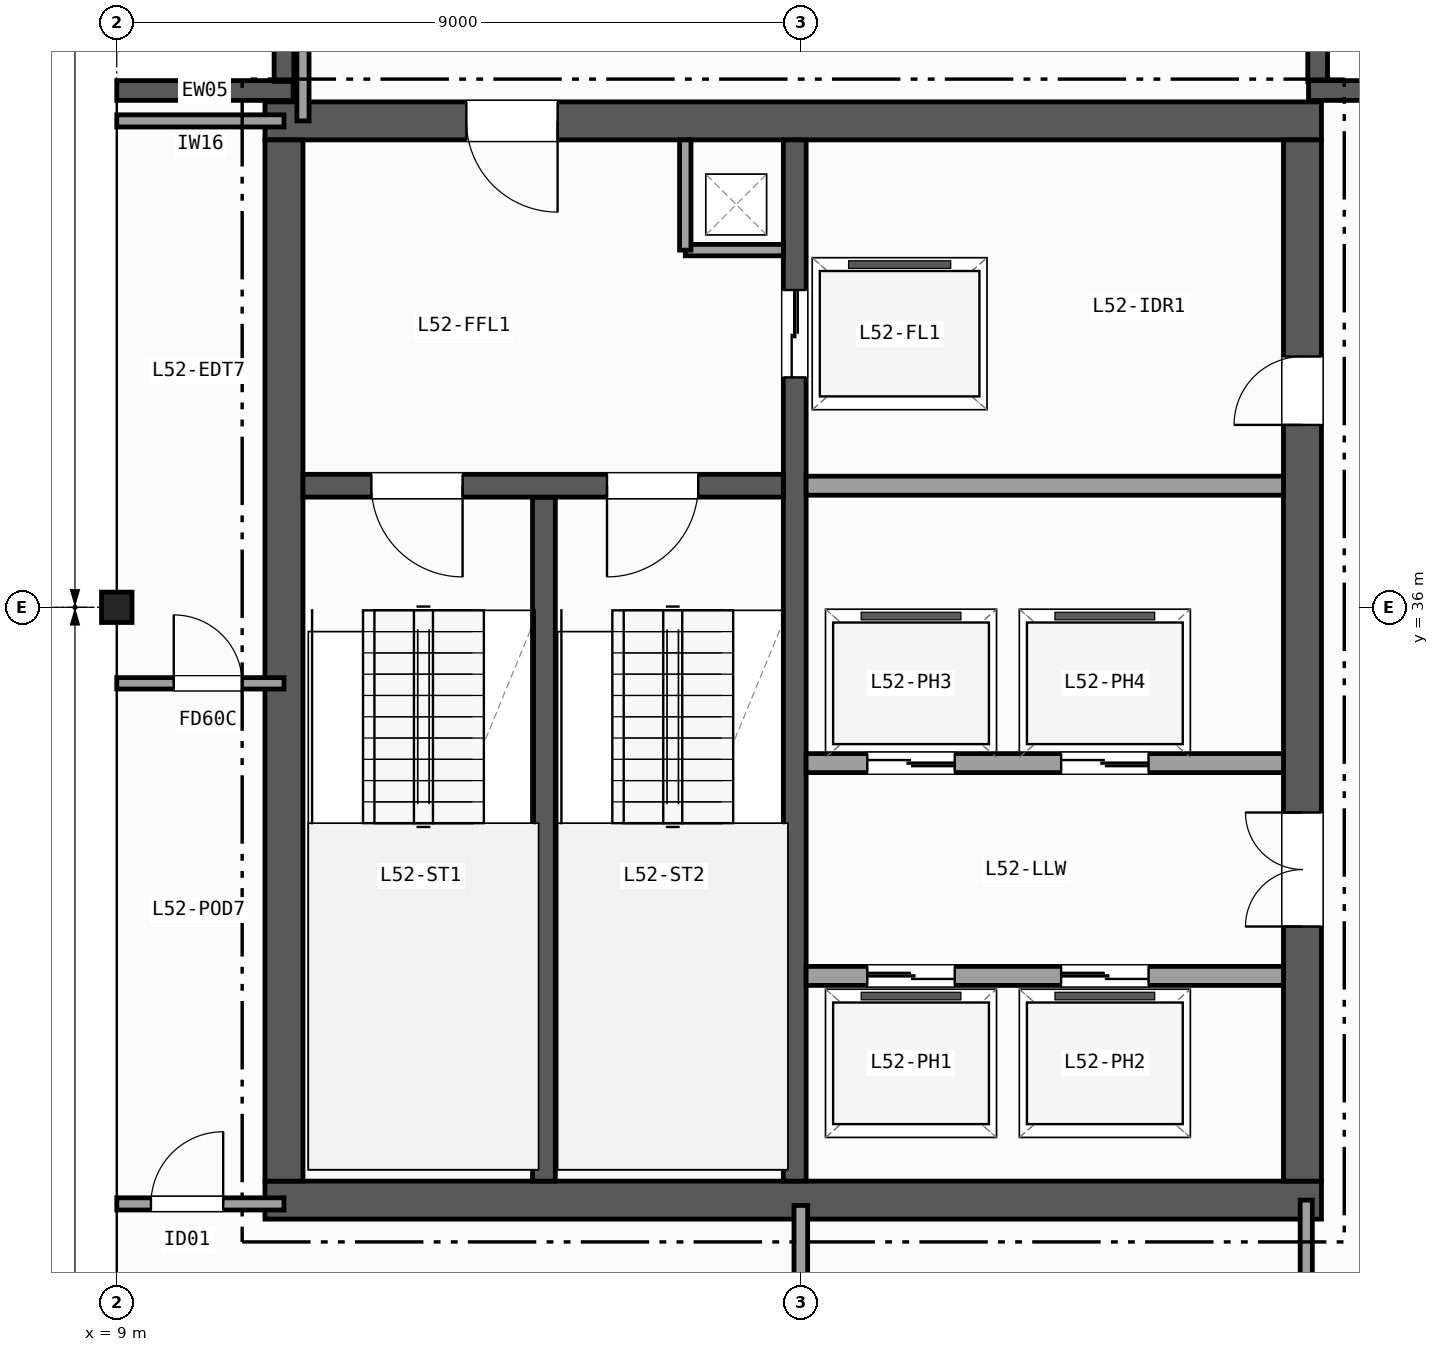
"""IFC4 building model, lengths in metres.
Left out: names, types, materials, properties, quantities, classifications, styles, units other than length and angle.
Written with IfcOpenShell. Run it as: python <this file> out.ifc"""

import sys

from ifc_helpers import new_model, si_unit, direction, frame, frame_2d, origin, origin_2d, place, context, subcontext, project, spatial, rectangle, i_section, extrude, element, fill, save


model = new_model("IFC4")
c1 = context("Model", 3, precision=1e-05, world=origin(), true_north=direction((0.0, 1.0)))
c2 = subcontext(c1, "Body", "Model", "MODEL_VIEW")
j1 = project(units=[si_unit("LENGTHUNIT", "METRE"), si_unit("PLANEANGLEUNIT", "RADIAN")], contexts=[c1])
p1 = place(None, origin())
s1 = spatial("IfcSite", under=j1, at=p1, CompositionType="ELEMENT")
p2 = place(p1, origin())
s2 = spatial("IfcBuilding", under=s1, at=p2, CompositionType="ELEMENT")
p3 = place(p2, frame((0.0, 0.0, 209.9)))
s3 = spatial("IfcBuildingStorey", under=s2, at=p3, CompositionType="ELEMENT", Elevation=209.9)
p4 = place(p3, frame((9.0, 36.0, 0.0), z_axis=(0.0, 0.0, 1.0), x_axis=(1.0, 0.0, 0.0)))
e1 = element("IfcColumn", 1, at=p4, inside=s3, PredefinedType="COLUMN", context=c2, shape_type="SweptSolid", body=[
    extrude(i_section(OverallWidth=0.401, OverallDepth=0.399, WebThickness=0.025, FlangeThickness=0.04, FilletRadius=0.015, at=origin_2d()), origin(), (0.0, 0.0, 1.0), 3.7),
])
p5 = place(p3, frame((9.0, 42.8, 0.0), z_axis=(0.0, 0.0, 1.0), x_axis=(1.0, 0.0, 0.0)))
e2 = element("IfcWall", 2, at=p5, inside=s3, PredefinedType="SOLIDWALL", context=c2, shape_type="SweptSolid", body=[
    extrude(rectangle(XDim=2.32, YDim=0.26, at=frame_2d((1.16, 0.0))), origin(), (0.0, 0.0, 1.0), 3.42),
])
for number, where, z_axis, x_axis in (
    (3, (11.2, 42.92, 0.0), (0.0, 0.0, 1.0), (0.0, 1.0, 0.0)),
    (4, (24.8, 45.0, 0.0), (0.0, 0.0, 1.0), (0.0, -1.0, 0.0)),
):
    element("IfcWall", number, at=place(p3, frame(where, z_axis=z_axis, x_axis=x_axis)), inside=s3, PredefinedType="SOLIDWALL", context=c2, shape_type="SweptSolid", body=[
        extrude(rectangle(XDim=2.08, YDim=0.26, at=frame_2d((1.04, 0.0))), origin(), (0.0, 0.0, 1.0), 3.42),
    ])
p6 = place(p3, frame((24.68, 42.8, 0.0), z_axis=(0.0, 0.0, 1.0), x_axis=(1.0, 0.0, 0.0)))
e5 = element("IfcWall", 5, at=p6, inside=s3, PredefinedType="SOLIDWALL", context=c2, shape_type="SweptSolid", body=[
    extrude(rectangle(XDim=2.32, YDim=0.26, at=frame_2d((1.16, 0.0))), origin(), (0.0, 0.0, 1.0), 3.42),
])
p7 = place(p3, frame((10.95, 28.2, 0.0), z_axis=(0.0, 0.0, 1.0), x_axis=(1.0, 0.0, 0.0)))
e6 = element("IfcWall", 6, at=p7, inside=s3, PredefinedType="SHEAR", context=c2, shape_type="SweptSolid", body=[
    extrude(rectangle(XDim=13.9, YDim=0.5, at=frame_2d((6.95, 0.0))), origin(), (0.0, 0.0, 1.0), 3.42),
])
p8 = place(p3, frame((24.85, 42.4, 0.0), z_axis=(0.0, 0.0, 1.0), x_axis=(-1.0, 0.0, 0.0)))
e7 = element("IfcWall", 7, at=p8, inside=s3, PredefinedType="SHEAR", context=c2, shape_type="SweptSolid", body=[
    extrude(rectangle(XDim=13.9, YDim=0.5, at=frame_2d((6.95, 0.0))), origin(), (0.0, 0.0, 1.0), 3.42),
])
p9 = place(p8, frame((10.05, 0.0, 0.0)))
e8 = element("IfcOpeningElement", 8, at=p9, cuts=e7, PredefinedType="OPENING", context=c2, shape_type="SweptSolid", body=[
    extrude(rectangle(XDim=1.2, YDim=2.15, at=frame_2d((0.6, 1.075))), frame((0.0, 0.26, 0.0), z_axis=(0.0, -1.0, 0.0), x_axis=(1.0, 0.0, 0.0)), (0.0, 0.0, 1.0), 0.52),
])
p10 = place(p3, frame((11.2, 42.15, 0.0), z_axis=(0.0, 0.0, 1.0), x_axis=(0.0, -1.0, 0.0)))
e9 = element("IfcWall", 9, at=p10, inside=s3, PredefinedType="SHEAR", context=c2, shape_type="SweptSolid", body=[
    extrude(rectangle(XDim=13.7, YDim=0.5, at=frame_2d((6.85, 0.0))), origin(), (0.0, 0.0, 1.0), 3.42),
])
p11 = place(p3, frame((24.6, 28.45, 0.0), z_axis=(0.0, 0.0, 1.0), x_axis=(0.0, 1.0, 0.0)))
e10 = element("IfcWall", 10, at=p11, inside=s3, PredefinedType="SHEAR", context=c2, shape_type="SweptSolid", body=[
    extrude(rectangle(XDim=13.7, YDim=0.5, at=frame_2d((6.85, 0.0))), origin(), (0.0, 0.0, 1.0), 3.42),
])
p12 = place(p11, frame((3.35, 0.0, 0.0)))
e11 = element("IfcOpeningElement", 11, at=p12, cuts=e10, PredefinedType="OPENING", context=c2, shape_type="SweptSolid", body=[
    extrude(rectangle(XDim=1.5, YDim=2.2, at=frame_2d((0.75, 1.1))), frame((0.0, 0.26, 0.0), z_axis=(0.0, -1.0, 0.0), x_axis=(1.0, 0.0, 0.0)), (0.0, 0.0, 1.0), 0.52),
])
p13 = place(p11, frame((9.95, 0.0, 0.0)))
e12 = element("IfcOpeningElement", 12, at=p13, cuts=e10, PredefinedType="OPENING", context=c2, shape_type="SweptSolid", body=[
    extrude(rectangle(XDim=0.9, YDim=2.1, at=frame_2d((0.45, 1.05))), frame((0.0, 0.26, 0.0), z_axis=(0.0, -1.0, 0.0), x_axis=(1.0, 0.0, 0.0)), (0.0, 0.0, 1.0), 0.52),
])
p14 = place(p3, frame((14.62, 28.45, 0.0), z_axis=(0.0, 0.0, 1.0), x_axis=(0.0, 1.0, 0.0)))
e13 = element("IfcWall", 13, at=p14, inside=s3, PredefinedType="SHEAR", context=c2, shape_type="SweptSolid", body=[
    extrude(rectangle(XDim=9.0, YDim=0.3, at=frame_2d((4.5, 0.0))), origin(), (0.0, 0.0, 1.0), 3.42),
])
p15 = place(p3, frame((17.92, 42.15, 0.0), z_axis=(0.0, 0.0, 1.0), x_axis=(0.0, -1.0, 0.0)))
e14 = element("IfcWall", 14, at=p15, inside=s3, PredefinedType="SHEAR", context=c2, shape_type="SweptSolid", body=[
    extrude(rectangle(XDim=13.7, YDim=0.3, at=frame_2d((6.85, 0.0))), origin(), (0.0, 0.0, 1.0), 3.42),
])
p16 = place(p15, frame((1.975, 0.0, 0.0)))
e15 = element("IfcOpeningElement", 15, at=p16, cuts=e14, PredefinedType="OPENING", context=c2, shape_type="SweptSolid", body=[
    extrude(rectangle(XDim=1.15, YDim=2.15, at=frame_2d((0.575, 1.075))), frame((0.0, 0.16, 0.0), z_axis=(0.0, -1.0, 0.0), x_axis=(1.0, 0.0, 0.0)), (0.0, 0.0, 1.0), 0.32),
])
p17 = place(p3, frame((17.77, 37.6, 0.0), z_axis=(0.0, 0.0, 1.0), x_axis=(-1.0, 0.0, 0.0)))
e16 = element("IfcWall", 16, at=p17, inside=s3, PredefinedType="SHEAR", context=c2, shape_type="SweptSolid", body=[
    extrude(rectangle(XDim=6.32, YDim=0.3, at=frame_2d((3.16, 0.0))), origin(), (0.0, 0.0, 1.0), 3.42),
])
p18 = place(p17, frame((4.22, 0.0, 0.0)))
e17 = element("IfcOpeningElement", 17, at=p18, cuts=e16, PredefinedType="OPENING", context=c2, shape_type="SweptSolid", body=[
    extrude(rectangle(XDim=1.2, YDim=2.15, at=frame_2d((0.6, 1.075))), frame((0.0, 0.16, 0.0), z_axis=(0.0, -1.0, 0.0), x_axis=(1.0, 0.0, 0.0)), (0.0, 0.0, 1.0), 0.32),
])
p19 = place(p17, frame((1.12, 0.0, 0.0)))
e18 = element("IfcOpeningElement", 18, at=p19, cuts=e16, PredefinedType="OPENING", context=c2, shape_type="SweptSolid", body=[
    extrude(rectangle(XDim=1.2, YDim=2.15, at=frame_2d((0.6, 1.075))), frame((0.0, 0.16, 0.0), z_axis=(0.0, -1.0, 0.0), x_axis=(1.0, 0.0, 0.0)), (0.0, 0.0, 1.0), 0.32),
])
p20 = place(p3, frame((16.48, 40.7, 0.0), z_axis=(0.0, 0.0, 1.0), x_axis=(1.0, 0.0, 0.0)))
e19 = element("IfcWall", 19, at=p20, inside=s3, PredefinedType="PARTITIONING", context=c2, shape_type="SweptSolid", body=[
    extrude(rectangle(XDim=1.29, YDim=0.15, at=frame_2d((0.645, 0.0))), origin(), (0.0, 0.0, 1.0), 3.42),
])
p21 = place(p3, frame((16.48, 40.7, 0.0), z_axis=(0.0, 0.0, 1.0), x_axis=(0.0, 1.0, 0.0)))
e20 = element("IfcWall", 20, at=p21, inside=s3, PredefinedType="PARTITIONING", context=c2, shape_type="SweptSolid", body=[
    extrude(rectangle(XDim=1.45, YDim=0.15, at=frame_2d((0.725, 0.0))), origin(), (0.0, 0.0, 1.0), 3.42),
])
p22 = place(p3, frame((18.07, 37.6, 0.0), z_axis=(0.0, 0.0, 1.0), x_axis=(1.0, 0.0, 0.0)))
e21 = element("IfcWall", 21, at=p22, inside=s3, PredefinedType="PARTITIONING", context=c2, shape_type="SweptSolid", body=[
    extrude(rectangle(XDim=6.28, YDim=0.25, at=frame_2d((3.14, 0.0))), origin(), (0.0, 0.0, 1.0), 3.42),
])
p23 = place(p3, frame((18.07, 31.15, 0.0), z_axis=(0.0, 0.0, 1.0), x_axis=(1.0, 0.0, 0.0)))
e22 = element("IfcWall", 22, at=p23, inside=s3, PredefinedType="PARTITIONING", context=c2, shape_type="SweptSolid", body=[
    extrude(rectangle(XDim=6.28, YDim=0.25, at=frame_2d((3.14, 0.0))), origin(), (0.0, 0.0, 1.0), 3.42),
])
p24 = place(p23, frame((0.805, 0.0, 0.0)))
e23 = element("IfcOpeningElement", 23, at=p24, cuts=e22, PredefinedType="OPENING", context=c2, shape_type="SweptSolid", body=[
    extrude(rectangle(XDim=1.15, YDim=2.15, at=frame_2d((0.575, 1.075))), frame((0.0, 0.135, 0.0), z_axis=(0.0, -1.0, 0.0), x_axis=(1.0, 0.0, 0.0)), (0.0, 0.0, 1.0), 0.27),
])
p25 = place(p23, frame((3.355, 0.0, 0.0)))
e24 = element("IfcOpeningElement", 24, at=p25, cuts=e22, PredefinedType="OPENING", context=c2, shape_type="SweptSolid", body=[
    extrude(rectangle(XDim=1.15, YDim=2.15, at=frame_2d((0.575, 1.075))), frame((0.0, 0.135, 0.0), z_axis=(0.0, -1.0, 0.0), x_axis=(1.0, 0.0, 0.0)), (0.0, 0.0, 1.0), 0.27),
])
p26 = place(p3, frame((24.35, 33.95, 0.0), z_axis=(0.0, 0.0, 1.0), x_axis=(-1.0, 0.0, 0.0)))
e25 = element("IfcWall", 25, at=p26, inside=s3, PredefinedType="PARTITIONING", context=c2, shape_type="SweptSolid", body=[
    extrude(rectangle(XDim=6.28, YDim=0.25, at=frame_2d((3.14, 0.0))), origin(), (0.0, 0.0, 1.0), 3.42),
])
p27 = place(p26, frame((4.325, 0.0, 0.0)))
e26 = element("IfcOpeningElement", 26, at=p27, cuts=e25, PredefinedType="OPENING", context=c2, shape_type="SweptSolid", body=[
    extrude(rectangle(XDim=1.15, YDim=2.15, at=frame_2d((0.575, 1.075))), frame((0.0, 0.135, 0.0), z_axis=(0.0, -1.0, 0.0), x_axis=(1.0, 0.0, 0.0)), (0.0, 0.0, 1.0), 0.27),
])
p28 = place(p26, frame((1.775, 0.0, 0.0)))
e27 = element("IfcOpeningElement", 27, at=p28, cuts=e25, PredefinedType="OPENING", context=c2, shape_type="SweptSolid", body=[
    extrude(rectangle(XDim=1.15, YDim=2.15, at=frame_2d((0.575, 1.075))), frame((0.0, 0.135, 0.0), z_axis=(0.0, -1.0, 0.0), x_axis=(1.0, 0.0, 0.0)), (0.0, 0.0, 1.0), 0.27),
])
p29 = place(p3, frame((9.0, 28.15, 0.0), z_axis=(0.0, 0.0, 1.0), x_axis=(1.0, 0.0, 0.0)))
e28 = element("IfcWall", 28, at=p29, inside=s3, PredefinedType="PARTITIONING", context=c2, shape_type="SweptSolid", body=[
    extrude(rectangle(XDim=2.2, YDim=0.16, at=frame_2d((1.1, 0.0))), origin(), (0.0, 0.0, 1.0), 2.707),
])
p30 = place(p29, frame((0.45, 0.0, 0.0)))
e29 = element("IfcOpeningElement", 29, at=p30, cuts=e28, PredefinedType="OPENING", context=c2, shape_type="SweptSolid", body=[
    extrude(rectangle(XDim=0.95, YDim=2.1, at=frame_2d((0.475, 1.05))), frame((0.0, 0.09, 0.0), z_axis=(0.0, -1.0, 0.0), x_axis=(1.0, 0.0, 0.0)), (0.0, 0.0, 1.0), 0.18),
])
p31 = place(p3, frame((9.0, 42.4, 0.0), z_axis=(0.0, 0.0, 1.0), x_axis=(1.0, 0.0, 0.0)))
e30 = element("IfcWall", 30, at=p31, inside=s3, PredefinedType="PARTITIONING", context=c2, shape_type="SweptSolid", body=[
    extrude(rectangle(XDim=2.2, YDim=0.16, at=frame_2d((1.1, 0.0))), origin(), (0.0, 0.0, 1.0), 3.42),
])
p32 = place(p3, frame((11.45, 42.4, 0.0), z_axis=(0.0, 0.0, 1.0), x_axis=(0.0, 1.0, 0.0)))
e31 = element("IfcWall", 31, at=p32, inside=s3, PredefinedType="PARTITIONING", context=c2, shape_type="SweptSolid", body=[
    extrude(rectangle(XDim=2.666, YDim=0.16, at=frame_2d((1.333, 0.0))), origin(), (0.0, 0.0, 1.0), 3.42),
])
p33 = place(p3, frame((9.0, 35.0, 0.0), z_axis=(0.0, 0.0, 1.0), x_axis=(1.0, 0.0, 0.0)))
e32 = element("IfcWall", 32, at=p33, inside=s3, PredefinedType="PARTITIONING", context=c2, shape_type="SweptSolid", body=[
    extrude(rectangle(XDim=2.2, YDim=0.15, at=frame_2d((1.1, 0.0))), origin(), (0.0, 0.0, 1.0), 2.707),
])
p34 = place(p33, frame((0.75, 0.0, 0.0)))
e33 = element("IfcOpeningElement", 33, at=p34, cuts=e32, PredefinedType="OPENING", context=c2, shape_type="SweptSolid", body=[
    extrude(rectangle(XDim=0.9, YDim=2.1, at=frame_2d((0.45, 1.05))), frame((0.0, 0.085, 0.0), z_axis=(0.0, -1.0, 0.0), x_axis=(1.0, 0.0, 0.0)), (0.0, 0.0, 1.0), 0.17),
])
p35 = place(p3, frame((24.65, 9.0, 0.0), z_axis=(0.0, 0.0, 1.0), x_axis=(0.0, 1.0, 0.0)))
e34 = element("IfcWall", 34, at=p35, inside=s3, PredefinedType="PARTITIONING", context=c2, shape_type="SweptSolid", body=[
    extrude(rectangle(XDim=19.2, YDim=0.16, at=frame_2d((9.6, 0.0))), origin(), (0.0, 0.0, 1.0), 2.707),
])
p36 = place(p35, frame((2.8, 0.0, 0.0)))
e35 = element("IfcOpeningElement", 35, at=p36, cuts=e34, PredefinedType="OPENING", context=c2, shape_type="SweptSolid", body=[
    extrude(rectangle(XDim=1.05, YDim=2.15, at=frame_2d((0.525, 1.075))), frame((0.0, 0.09, 0.0), z_axis=(0.0, -1.0, 0.0), x_axis=(1.0, 0.0, 0.0)), (0.0, 0.0, 1.0), 0.18),
])
p37 = place(p35, frame((8.95, 0.0, 0.0)))
e36 = element("IfcOpeningElement", 36, at=p37, cuts=e34, PredefinedType="OPENING", context=c2, shape_type="SweptSolid", body=[
    extrude(rectangle(XDim=1.2, YDim=2.15, at=frame_2d((0.6, 1.075))), frame((0.0, 0.09, 0.0), z_axis=(0.0, -1.0, 0.0), x_axis=(1.0, 0.0, 0.0)), (0.0, 0.0, 1.0), 0.18),
])
p38 = place(p35, frame((15.215, 0.0, 0.0)))
e37 = element("IfcOpeningElement", 37, at=p38, cuts=e34, PredefinedType="OPENING", context=c2, shape_type="SweptSolid", body=[
    extrude(rectangle(XDim=0.86, YDim=2.05, at=frame_2d((0.43, 1.025))), frame((0.0, 0.09, 0.0), z_axis=(0.0, -1.0, 0.0), x_axis=(1.0, 0.0, 0.0)), (0.0, 0.0, 1.0), 0.18),
])
p39 = place(p3, frame((18.0, 9.0, 0.0), z_axis=(0.0, 0.0, 1.0), x_axis=(0.0, 1.0, 0.0)))
e38 = element("IfcWall", 38, at=p39, inside=s3, PredefinedType="PARTITIONING", context=c2, shape_type="SweptSolid", body=[
    extrude(rectangle(XDim=19.13, YDim=0.18, at=frame_2d((9.565, 0.0))), origin(), (0.0, 0.0, 1.0), 2.707),
])
p40 = place(p39, frame((2.2, 0.0, 0.0)))
e39 = element("IfcOpeningElement", 39, at=p40, cuts=e38, PredefinedType="OPENING", context=c2, shape_type="SweptSolid", body=[
    extrude(rectangle(XDim=0.95, YDim=2.1, at=frame_2d((0.475, 1.05))), frame((0.0, 0.1, 0.0), z_axis=(0.0, -1.0, 0.0), x_axis=(1.0, 0.0, 0.0)), (0.0, 0.0, 1.0), 0.2),
])
p41 = place(p39, frame((13.5, 0.0, 0.0)))
e40 = element("IfcOpeningElement", 40, at=p41, cuts=e38, PredefinedType="OPENING", context=c2, shape_type="SweptSolid", body=[
    extrude(rectangle(XDim=1.0, YDim=2.1, at=frame_2d((0.5, 1.05))), frame((0.0, 0.1, 0.0), z_axis=(0.0, -1.0, 0.0), x_axis=(1.0, 0.0, 0.0)), (0.0, 0.0, 1.0), 0.2),
])
p42 = place(p18, origin())
e41 = element("IfcDoor", 41, at=p42, inside=s3, OperationType="SINGLE_SWING_LEFT", PredefinedType="DOOR", context=c2, shape_type="SweptSolid", body=[
    extrude(rectangle(XDim=1.2, YDim=2.15, at=frame_2d((0.6, 1.075))), frame((0.0, 0.025, 0.0), z_axis=(0.0, -1.0, 0.0), x_axis=(1.0, 0.0, 0.0)), (0.0, 0.0, 1.0), 0.05),
])
fill(e17, e41)
p43 = place(p19, origin())
e42 = element("IfcDoor", 42, at=p43, inside=s3, OperationType="SINGLE_SWING_RIGHT", PredefinedType="DOOR", context=c2, shape_type="SweptSolid", body=[
    extrude(rectangle(XDim=1.2, YDim=2.15, at=frame_2d((0.6, 1.075))), frame((0.0, 0.025, 0.0), z_axis=(0.0, -1.0, 0.0), x_axis=(1.0, 0.0, 0.0)), (0.0, 0.0, 1.0), 0.05),
])
fill(e18, e42)
p44 = place(p12, origin())
e43 = element("IfcDoor", 43, at=p44, inside=s3, OperationType="DOUBLE_DOOR_SINGLE_SWING", PredefinedType="DOOR", context=c2, shape_type="SweptSolid", body=[
    extrude(rectangle(XDim=1.5, YDim=2.2, at=frame_2d((0.75, 1.1))), frame((0.0, 0.025, 0.0), z_axis=(0.0, -1.0, 0.0), x_axis=(1.0, 0.0, 0.0)), (0.0, 0.0, 1.0), 0.05),
])
fill(e11, e43)
p45 = place(p9, origin())
e44 = element("IfcDoor", 44, at=p45, inside=s3, OperationType="SINGLE_SWING_LEFT", PredefinedType="DOOR", context=c2, shape_type="SweptSolid", body=[
    extrude(rectangle(XDim=1.2, YDim=2.15, at=frame_2d((0.6, 1.075))), frame((0.0, 0.025, 0.0), z_axis=(0.0, -1.0, 0.0), x_axis=(1.0, 0.0, 0.0)), (0.0, 0.0, 1.0), 0.05),
])
fill(e8, e44)
p46 = place(p13, origin())
e45 = element("IfcDoor", 45, at=p46, inside=s3, OperationType="SINGLE_SWING_LEFT", PredefinedType="DOOR", context=c2, shape_type="SweptSolid", body=[
    extrude(rectangle(XDim=0.9, YDim=2.1, at=frame_2d((0.45, 1.05))), frame((0.0, 0.025, 0.0), z_axis=(0.0, -1.0, 0.0), x_axis=(1.0, 0.0, 0.0)), (0.0, 0.0, 1.0), 0.05),
])
fill(e12, e45)
p47 = place(p16, origin())
e46 = element("IfcDoor", 46, at=p47, inside=s3, OperationType="DOUBLE_DOOR_SLIDING", PredefinedType="DOOR", context=c2, shape_type="SweptSolid", body=[
    extrude(rectangle(XDim=1.15, YDim=2.15, at=frame_2d((0.575, 1.075))), frame((0.0, 0.025, 0.0), z_axis=(0.0, -1.0, 0.0), x_axis=(1.0, 0.0, 0.0)), (0.0, 0.0, 1.0), 0.05),
])
fill(e15, e46)
p48 = place(p24, origin())
e47 = element("IfcDoor", 47, at=p48, inside=s3, OperationType="DOUBLE_DOOR_SLIDING", PredefinedType="DOOR", context=c2, shape_type="SweptSolid", body=[
    extrude(rectangle(XDim=1.15, YDim=2.15, at=frame_2d((0.575, 1.075))), frame((0.0, 0.025, 0.0), z_axis=(0.0, -1.0, 0.0), x_axis=(1.0, 0.0, 0.0)), (0.0, 0.0, 1.0), 0.05),
])
fill(e23, e47)
p49 = place(p25, origin())
e48 = element("IfcDoor", 48, at=p49, inside=s3, OperationType="DOUBLE_DOOR_SLIDING", PredefinedType="DOOR", context=c2, shape_type="SweptSolid", body=[
    extrude(rectangle(XDim=1.15, YDim=2.15, at=frame_2d((0.575, 1.075))), frame((0.0, 0.025, 0.0), z_axis=(0.0, -1.0, 0.0), x_axis=(1.0, 0.0, 0.0)), (0.0, 0.0, 1.0), 0.05),
])
fill(e24, e48)
p50 = place(p27, origin())
e49 = element("IfcDoor", 49, at=p50, inside=s3, OperationType="DOUBLE_DOOR_SLIDING", PredefinedType="DOOR", context=c2, shape_type="SweptSolid", body=[
    extrude(rectangle(XDim=1.15, YDim=2.15, at=frame_2d((0.575, 1.075))), frame((0.0, 0.025, 0.0), z_axis=(0.0, -1.0, 0.0), x_axis=(1.0, 0.0, 0.0)), (0.0, 0.0, 1.0), 0.05),
])
fill(e26, e49)
p51 = place(p28, origin())
e50 = element("IfcDoor", 50, at=p51, inside=s3, OperationType="DOUBLE_DOOR_SLIDING", PredefinedType="DOOR", context=c2, shape_type="SweptSolid", body=[
    extrude(rectangle(XDim=1.15, YDim=2.15, at=frame_2d((0.575, 1.075))), frame((0.0, 0.025, 0.0), z_axis=(0.0, -1.0, 0.0), x_axis=(1.0, 0.0, 0.0)), (0.0, 0.0, 1.0), 0.05),
])
fill(e27, e50)
p52 = place(p30, origin())
e51 = element("IfcDoor", 51, at=p52, inside=s3, OperationType="SINGLE_SWING_RIGHT", PredefinedType="DOOR", context=c2, shape_type="SweptSolid", body=[
    extrude(rectangle(XDim=0.95, YDim=2.1, at=frame_2d((0.475, 1.05))), frame((0.0, 0.025, 0.0), z_axis=(0.0, -1.0, 0.0), x_axis=(1.0, 0.0, 0.0)), (0.0, 0.0, 1.0), 0.05),
])
fill(e29, e51)
p53 = place(p34, origin())
e52 = element("IfcDoor", 52, at=p53, inside=s3, OperationType="SINGLE_SWING_LEFT", PredefinedType="DOOR", context=c2, shape_type="SweptSolid", body=[
    extrude(rectangle(XDim=0.9, YDim=2.1, at=frame_2d((0.45, 1.05))), frame((0.0, 0.025, 0.0), z_axis=(0.0, -1.0, 0.0), x_axis=(1.0, 0.0, 0.0)), (0.0, 0.0, 1.0), 0.05),
])
fill(e33, e52)
save(model, sys.argv[1])
